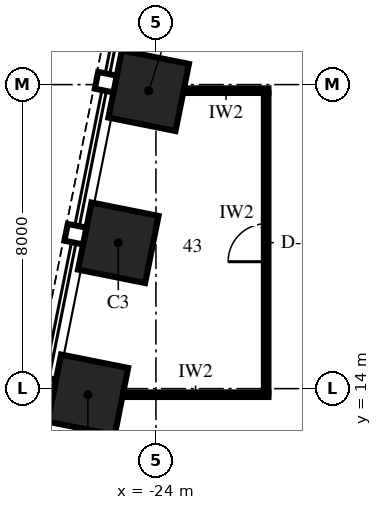
"""IFC4 building model, lengths in metres.
Left out: names, types, materials, properties, quantities, classifications, styles, units other than length and angle.
Written with IfcOpenShell. Run it as: python <this file> out.ifc"""

import sys

from ifc_helpers import new_model, si_unit, direction, frame, frame_2d, origin, origin_2d, place, context, subcontext, project, spatial, rectangle, extrude, element, fill, save


model = new_model("IFC4")
c1 = context("Model", 3, precision=1e-05, world=origin(), true_north=direction((0.0, 1.0)))
c2 = subcontext(c1, "Body", "Model", "MODEL_VIEW")
j1 = project(units=[si_unit("LENGTHUNIT", "METRE"), si_unit("PLANEANGLEUNIT", "RADIAN")], contexts=[c1])
p1 = place(None, origin())
s1 = spatial("IfcSite", under=j1, at=p1, CompositionType="ELEMENT")
p2 = place(p1, origin())
s2 = spatial("IfcBuilding", under=s1, at=p2, CompositionType="ELEMENT")
p3 = place(p2, frame((0.0, 0.0, 139.0)))
s3 = spatial("IfcBuildingStorey", under=s2, at=p3, CompositionType="ELEMENT", Elevation=139.0)
for number, where, z_axis, x_axis in (
    (1, (-24.191, 21.838, 0.0), (0.0, 0.0, 1.0), (-0.196, -0.981, 0.0)),
    (2, (-24.991, 17.838, 0.0), (0.0, 0.0, 1.0), (-0.196, -0.981, 0.0)),
    (3, (-25.791, 13.838, 0.0), (0.0, 0.0, 1.0), (-0.196, -0.981, 0.0)),
):
    element("IfcColumn", number, at=place(p3, frame(where, z_axis=z_axis, x_axis=x_axis)), inside=s3, PredefinedType="COLUMN", context=c2, shape_type="SweptSolid", body=[
        extrude(rectangle(XDim=1.8, YDim=1.8, at=origin_2d()), origin(), (0.0, 0.0, 1.0), 4.0),
    ])
p4 = place(p3, frame((-24.873, 13.84, 0.0), z_axis=(0.0, 0.0, 1.0), x_axis=(1.0, 0.0, 0.0)))
e4 = element("IfcWall", 4, at=p4, inside=s3, PredefinedType="PARTITIONING", context=c2, shape_type="SweptSolid", body=[
    extrude(rectangle(XDim=3.833, YDim=0.12, at=frame_2d((1.917, 0.0))), origin(), (0.0, 0.0, 1.0), 3.25),
])
p5 = place(p3, frame((-23.273, 21.84, 0.0), z_axis=(0.0, 0.0, 1.0), x_axis=(1.0, 0.0, 0.0)))
e5 = element("IfcWall", 5, at=p5, inside=s3, PredefinedType="PARTITIONING", context=c2, shape_type="SweptSolid", body=[
    extrude(rectangle(XDim=2.233, YDim=0.12, at=frame_2d((1.116, 0.0))), origin(), (0.0, 0.0, 1.0), 3.25),
])
p6 = place(p3, frame((-21.1, 13.9, 0.0), z_axis=(0.0, 0.0, 1.0), x_axis=(0.0, 1.0, 0.0)))
e6 = element("IfcWall", 6, at=p6, inside=s3, PredefinedType="PARTITIONING", context=c2, shape_type="SweptSolid", body=[
    extrude(rectangle(XDim=7.88, YDim=0.12, at=frame_2d((3.94, 0.0))), origin(), (0.0, 0.0, 1.0), 3.25),
])
p7 = place(p6, frame((3.44, 0.0, 0.0)))
e7 = element("IfcOpeningElement", 7, at=p7, cuts=e6, PredefinedType="OPENING", context=c2, shape_type="SweptSolid", body=[
    extrude(rectangle(XDim=1.0, YDim=2.4, at=frame_2d((0.5, 1.2))), frame((0.0, 0.075, 0.0), z_axis=(0.0, -1.0, 0.0), x_axis=(1.0, 0.0, 0.0)), (0.0, 0.0, 1.0), 0.15),
])
p8 = place(p7, origin())
e8 = element("IfcDoor", 8, at=p8, inside=s3, OperationType="SINGLE_SWING_RIGHT", PredefinedType="DOOR", context=c2, shape_type="SweptSolid", body=[
    extrude(rectangle(XDim=1.0, YDim=2.4, at=frame_2d((0.5, 1.2))), frame((0.0, 0.06, 0.0), z_axis=(0.0, -1.0, 0.0), x_axis=(1.0, 0.0, 0.0)), (0.0, 0.0, 1.0), 0.12),
])
fill(e7, e8)
save(model, sys.argv[1])
